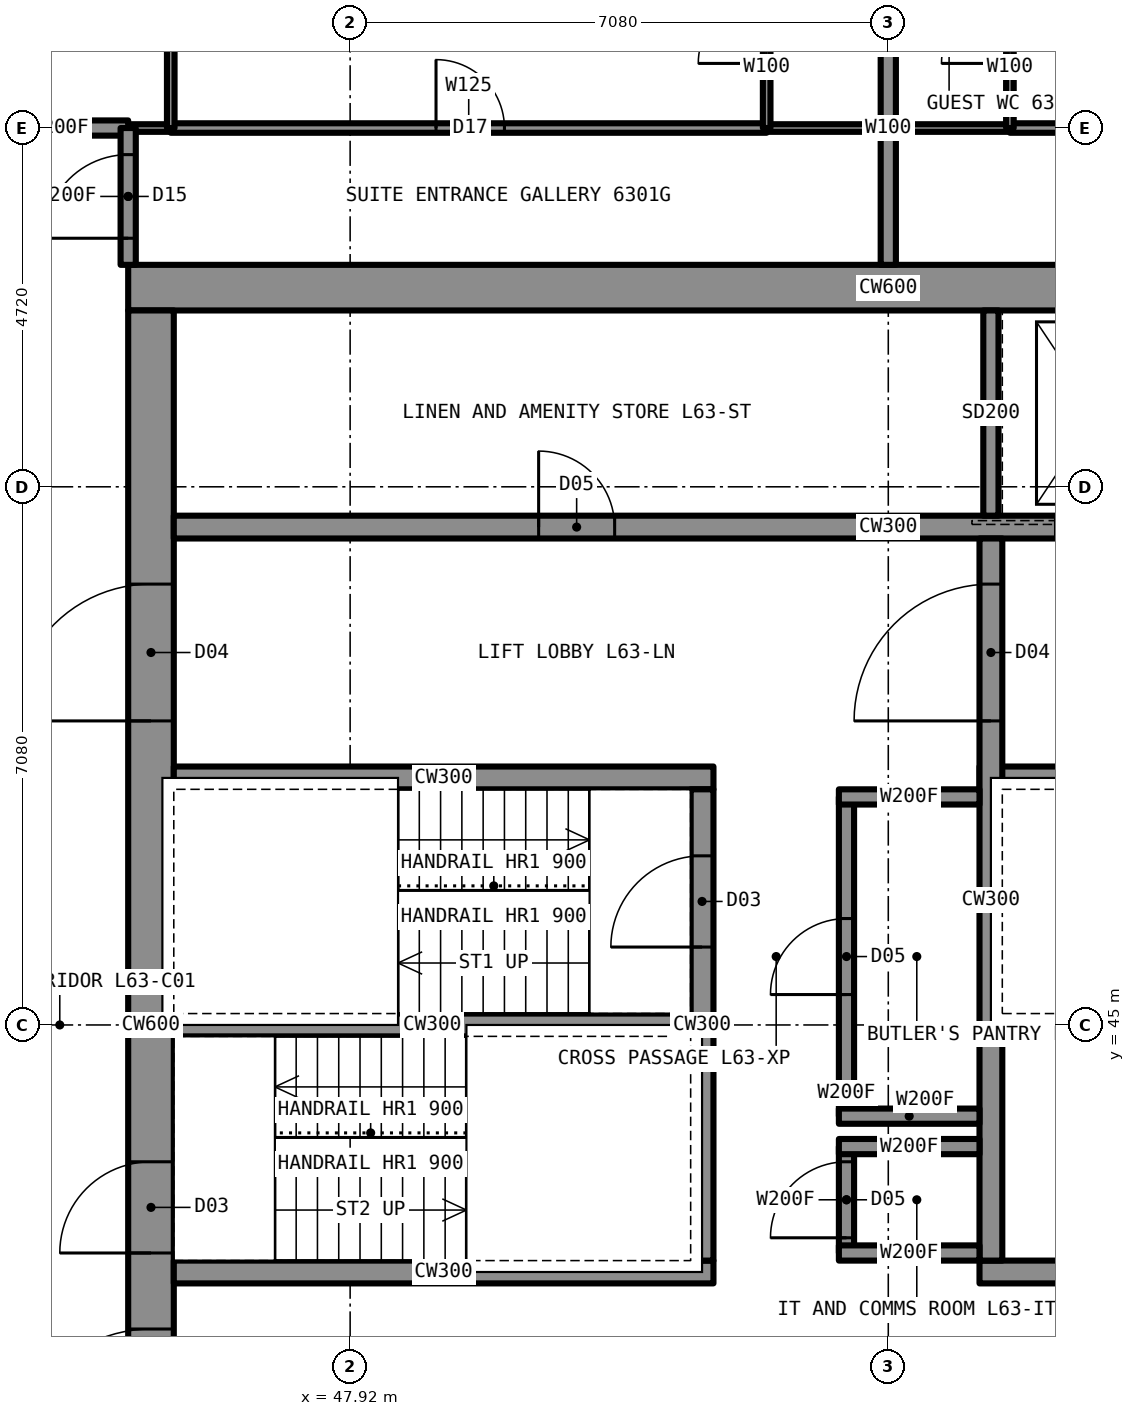
"""IFC4 building model, lengths in metres.
Left out: names, types, materials, properties, quantities, classifications, styles, units other than length and angle.
Written with IfcOpenShell. Run it as: python <this file> out.ifc"""

import sys

from ifc_helpers import new_model, si_unit, direction, frame, frame_2d, origin, place, context, subcontext, project, spatial, rectangle, extrude, element, fill, save


model = new_model("IFC4")
c1 = context("Model", 3, precision=1e-05, world=origin(), true_north=direction((0.0, 1.0)))
c2 = subcontext(c1, "Body", "Model", "MODEL_VIEW")
j1 = project(units=[si_unit("LENGTHUNIT", "METRE"), si_unit("PLANEANGLEUNIT", "RADIAN")], contexts=[c1])
p1 = place(None, origin())
s1 = spatial("IfcSite", under=j1, at=p1, CompositionType="ELEMENT")
p2 = place(p1, origin())
s2 = spatial("IfcBuilding", under=s1, at=p2, CompositionType="ELEMENT")
p3 = place(p2, frame((0.0, 0.0, 226.7)))
s3 = spatial("IfcBuildingStorey", under=s2, at=p3, CompositionType="ELEMENT", Elevation=226.7)
p4 = place(p3, frame((45.0, 54.7, 0.0), z_axis=(0.0, 0.0, 1.0), x_axis=(1.0, 0.0, 0.0)))
e1 = element("IfcWall", 1, at=p4, inside=s3, PredefinedType="SHEAR", context=c2, shape_type="SweptSolid", body=[
    extrude(rectangle(XDim=20.0, YDim=0.6, at=frame_2d((10.0, 0.0))), origin(), (0.0, 0.0, 1.0), 3.5),
])
p5 = place(p3, frame((45.3, 35.6, 0.0), z_axis=(0.0, 0.0, 1.0), x_axis=(0.0, 1.0, 0.0)))
e2 = element("IfcWall", 2, at=p5, inside=s3, PredefinedType="SHEAR", context=c2, shape_type="SweptSolid", body=[
    extrude(rectangle(XDim=18.8, YDim=0.6, at=frame_2d((9.4, 0.0))), origin(), (0.0, 0.0, 1.0), 3.5),
])
p6 = place(p5, frame((13.4, 0.0, 0.0)))
e3 = element("IfcOpeningElement", 3, at=p6, cuts=e2, PredefinedType="OPENING", context=c2, shape_type="SweptSolid", body=[
    extrude(rectangle(XDim=1.8, YDim=2.2, at=frame_2d((0.9, 1.1))), frame((0.0, 0.31, 0.0), z_axis=(0.0, -1.0, 0.0), x_axis=(1.0, 0.0, 0.0)), (0.0, 0.0, 1.0), 0.62),
])
p7 = place(p5, frame((3.6, 0.0, 0.0)))
e4 = element("IfcOpeningElement", 4, at=p7, cuts=e2, PredefinedType="OPENING", context=c2, shape_type="SweptSolid", body=[
    extrude(rectangle(XDim=1.8, YDim=2.2, at=frame_2d((0.9, 1.1))), frame((0.0, 0.31, 0.0), z_axis=(0.0, -1.0, 0.0), x_axis=(1.0, 0.0, 0.0)), (0.0, 0.0, 1.0), 0.62),
])
p8 = place(p5, frame((6.4, 0.0, 0.0)))
e5 = element("IfcOpeningElement", 5, at=p8, cuts=e2, PredefinedType="OPENING", context=c2, shape_type="SweptSolid", body=[
    extrude(rectangle(XDim=1.2, YDim=2.2, at=frame_2d((0.6, 1.1))), frame((0.0, 0.31, 0.0), z_axis=(0.0, -1.0, 0.0), x_axis=(1.0, 0.0, 0.0)), (0.0, 0.0, 1.0), 0.62),
])
p9 = place(p3, frame((45.6, 51.55, 0.0), z_axis=(0.0, 0.0, 1.0), x_axis=(1.0, 0.0, 0.0)))
e6 = element("IfcWall", 6, at=p9, inside=s3, PredefinedType="SHEAR", context=c2, shape_type="SweptSolid", body=[
    extrude(rectangle(XDim=18.8, YDim=0.3, at=frame_2d((9.4, 0.0))), origin(), (0.0, 0.0, 1.0), 3.5),
])
p10 = place(p9, frame((4.8, 0.0, 0.0)))
e7 = element("IfcOpeningElement", 7, at=p10, cuts=e6, PredefinedType="OPENING", context=c2, shape_type="SweptSolid", body=[
    extrude(rectangle(XDim=1.0, YDim=2.1, at=frame_2d((0.5, 1.05))), frame((0.0, 0.16, 0.0), z_axis=(0.0, -1.0, 0.0), x_axis=(1.0, 0.0, 0.0)), (0.0, 0.0, 1.0), 0.32),
])
p11 = place(p9, frame((11.6, 0.0, 0.0)))
e8 = element("IfcOpeningElement", 8, at=p11, cuts=e6, PredefinedType="OPENING", context=c2, shape_type="SweptSolid", body=[
    extrude(rectangle(XDim=1.1, YDim=2.2, at=frame_2d((0.55, 1.1))), frame((0.0, 0.16, 0.0), z_axis=(0.0, -1.0, 0.0), x_axis=(1.0, 0.0, 0.0)), (0.0, 0.0, 1.0), 0.32),
])
p12 = place(p9, frame((14.3, 0.0, 0.0)))
e9 = element("IfcOpeningElement", 9, at=p12, cuts=e6, PredefinedType="OPENING", context=c2, shape_type="SweptSolid", body=[
    extrude(rectangle(XDim=1.1, YDim=2.2, at=frame_2d((0.55, 1.1))), frame((0.0, 0.16, 0.0), z_axis=(0.0, -1.0, 0.0), x_axis=(1.0, 0.0, 0.0)), (0.0, 0.0, 1.0), 0.32),
])
p13 = place(p3, frame((45.6, 48.25, 0.0), z_axis=(0.0, 0.0, 1.0), x_axis=(1.0, 0.0, 0.0)))
e10 = element("IfcWall", 10, at=p13, inside=s3, PredefinedType="SHEAR", context=c2, shape_type="SweptSolid", body=[
    extrude(rectangle(XDim=7.1, YDim=0.3, at=frame_2d((3.55, 0.0))), origin(), (0.0, 0.0, 1.0), 3.5),
])
p14 = place(p3, frame((56.2, 48.25, 0.0), z_axis=(0.0, 0.0, 1.0), x_axis=(1.0, 0.0, 0.0)))
e11 = element("IfcWall", 11, at=p14, inside=s3, PredefinedType="SHEAR", context=c2, shape_type="SweptSolid", body=[
    extrude(rectangle(XDim=8.2, YDim=0.3, at=frame_2d((4.1, 0.0))), origin(), (0.0, 0.0, 1.0), 3.5),
])
p15 = place(p14, frame((6.95, 0.0, 0.0)))
e12 = element("IfcOpeningElement", 12, at=p15, cuts=e11, PredefinedType="OPENING", context=c2, shape_type="SweptSolid", body=[
    extrude(rectangle(XDim=1.2, YDim=2.2, at=frame_2d((0.6, 1.1))), frame((0.0, 0.16, 0.0), z_axis=(0.0, -1.0, 0.0), x_axis=(1.0, 0.0, 0.0)), (0.0, 0.0, 1.0), 0.32),
])
p16 = place(p3, frame((45.6, 41.75, 0.0), z_axis=(0.0, 0.0, 1.0), x_axis=(1.0, 0.0, 0.0)))
e13 = element("IfcWall", 13, at=p16, inside=s3, PredefinedType="SHEAR", context=c2, shape_type="SweptSolid", body=[
    extrude(rectangle(XDim=7.1, YDim=0.3, at=frame_2d((3.55, 0.0))), origin(), (0.0, 0.0, 1.0), 3.5),
])
p17 = place(p3, frame((56.2, 41.75, 0.0), z_axis=(0.0, 0.0, 1.0), x_axis=(1.0, 0.0, 0.0)))
e14 = element("IfcWall", 14, at=p17, inside=s3, PredefinedType="SHEAR", context=c2, shape_type="SweptSolid", body=[
    extrude(rectangle(XDim=8.2, YDim=0.3, at=frame_2d((4.1, 0.0))), origin(), (0.0, 0.0, 1.0), 3.5),
])
p18 = place(p17, frame((3.3, 0.0, 0.0)))
e15 = element("IfcOpeningElement", 15, at=p18, cuts=e14, PredefinedType="OPENING", context=c2, shape_type="SweptSolid", body=[
    extrude(rectangle(XDim=1.0, YDim=2.1, at=frame_2d((0.5, 1.05))), frame((0.0, 0.16, 0.0), z_axis=(0.0, -1.0, 0.0), x_axis=(1.0, 0.0, 0.0)), (0.0, 0.0, 1.0), 0.32),
])
p19 = place(p3, frame((52.55, 41.9, 0.0), z_axis=(0.0, 0.0, 1.0), x_axis=(0.0, 1.0, 0.0)))
e16 = element("IfcWall", 16, at=p19, inside=s3, PredefinedType="SHEAR", context=c2, shape_type="SweptSolid", body=[
    extrude(rectangle(XDim=6.2, YDim=0.3, at=frame_2d((3.1, 0.0))), origin(), (0.0, 0.0, 1.0), 3.5),
])
p20 = place(p19, frame((4.125, 0.0, 0.0)))
e17 = element("IfcOpeningElement", 17, at=p20, cuts=e16, PredefinedType="OPENING", context=c2, shape_type="SweptSolid", body=[
    extrude(rectangle(XDim=1.2, YDim=2.2, at=frame_2d((0.6, 1.1))), frame((0.0, 0.16, 0.0), z_axis=(0.0, -1.0, 0.0), x_axis=(1.0, 0.0, 0.0)), (0.0, 0.0, 1.0), 0.32),
])
p21 = place(p3, frame((56.35, 41.9, 0.0), z_axis=(0.0, 0.0, 1.0), x_axis=(0.0, 1.0, 0.0)))
e18 = element("IfcWall", 18, at=p21, inside=s3, PredefinedType="SHEAR", context=c2, shape_type="SweptSolid", body=[
    extrude(rectangle(XDim=9.5, YDim=0.3, at=frame_2d((4.75, 0.0))), origin(), (0.0, 0.0, 1.0), 3.5),
])
p22 = place(p21, frame((7.1, 0.0, 0.0)))
e19 = element("IfcOpeningElement", 19, at=p22, cuts=e18, PredefinedType="OPENING", context=c2, shape_type="SweptSolid", body=[
    extrude(rectangle(XDim=1.8, YDim=2.2, at=frame_2d((0.9, 1.1))), frame((0.0, 0.16, 0.0), z_axis=(0.0, -1.0, 0.0), x_axis=(1.0, 0.0, 0.0)), (0.0, 0.0, 1.0), 0.32),
])
p23 = place(p3, frame((45.6, 45.0, 0.0), z_axis=(0.0, 0.0, 1.0), x_axis=(1.0, 0.0, 0.0)))
e20 = element("IfcWall", 20, at=p23, inside=s3, PredefinedType="SHEAR", context=c2, shape_type="SweptSolid", body=[
    extrude(rectangle(XDim=6.8, YDim=0.3, at=frame_2d((3.4, 0.0))), origin(), (0.0, 0.0, 1.0), 3.5),
])
p24 = place(p3, frame((56.5, 45.0, 0.0), z_axis=(0.0, 0.0, 1.0), x_axis=(1.0, 0.0, 0.0)))
e21 = element("IfcWall", 21, at=p24, inside=s3, PredefinedType="SHEAR", context=c2, shape_type="SweptSolid", body=[
    extrude(rectangle(XDim=7.9, YDim=0.3, at=frame_2d((3.95, 0.0))), origin(), (0.0, 0.0, 1.0), 3.5),
])
p25 = place(p3, frame((45.0, 56.8, 0.0), z_axis=(0.0, 0.0, 1.0), x_axis=(1.0, 0.0, 0.0)))
e22 = element("IfcWall", 22, at=p25, inside=s3, PredefinedType="PARTITIONING", context=c2, shape_type="SweptSolid", body=[
    extrude(rectangle(XDim=0.56, YDim=0.1, at=frame_2d((0.28, 0.0))), origin(), (0.0, 0.0, 1.0), 3.33),
])
p26 = place(p3, frame((53.4, 56.8, 0.0), z_axis=(0.0, 0.0, 1.0), x_axis=(1.0, 0.0, 0.0)))
e23 = element("IfcWall", 23, at=p26, inside=s3, PredefinedType="PARTITIONING", context=c2, shape_type="SweptSolid", body=[
    extrude(rectangle(XDim=3.2, YDim=0.1, at=frame_2d((1.6, 0.0))), origin(), (0.0, 0.0, 1.0), 3.33),
])
p27 = place(p3, frame((43.2, 56.8, 0.0), z_axis=(0.0, 0.0, 1.0), x_axis=(1.0, 0.0, 0.0)))
e24 = element("IfcWall", 24, at=p27, inside=s3, PredefinedType="PARTITIONING", context=c2, shape_type="SweptSolid", body=[
    extrude(rectangle(XDim=1.8, YDim=0.2, at=frame_2d((0.9, 0.0))), origin(), (0.0, 0.0, 1.0), 3.33),
])
p28 = place(p3, frame((45.56, 56.8, 0.0), z_axis=(0.0, 0.0, 1.0), x_axis=(1.0, 0.0, 0.0)))
e25 = element("IfcWall", 25, at=p28, inside=s3, PredefinedType="PARTITIONING", context=c2, shape_type="SweptSolid", body=[
    extrude(rectangle(XDim=7.84, YDim=0.125, at=frame_2d((3.92, 0.0))), origin(), (0.0, 0.0, 1.0), 3.33),
])
p29 = place(p28, frame((3.49, 0.0, 0.0)))
e26 = element("IfcOpeningElement", 26, at=p29, cuts=e25, PredefinedType="OPENING", context=c2, shape_type="SweptSolid", body=[
    extrude(rectangle(XDim=0.9, YDim=2.2, at=frame_2d((0.45, 1.1))), frame((0.0, 0.073, 0.0), z_axis=(0.0, -1.0, 0.0), x_axis=(1.0, 0.0, 0.0)), (0.0, 0.0, 1.0), 0.145),
])
p30 = place(p3, frame((56.6, 56.8, 0.0), z_axis=(0.0, 0.0, 1.0), x_axis=(1.0, 0.0, 0.0)))
e27 = element("IfcWall", 27, at=p30, inside=s3, PredefinedType="PARTITIONING", context=c2, shape_type="SweptSolid", body=[
    extrude(rectangle(XDim=7.84, YDim=0.125, at=frame_2d((3.92, 0.0))), origin(), (0.0, 0.0, 1.0), 3.33),
])
p31 = place(p30, frame((3.45, 0.0, 0.0)))
e28 = element("IfcOpeningElement", 28, at=p31, cuts=e27, PredefinedType="OPENING", context=c2, shape_type="SweptSolid", body=[
    extrude(rectangle(XDim=0.9, YDim=2.2, at=frame_2d((0.45, 1.1))), frame((0.0, 0.073, 0.0), z_axis=(0.0, -1.0, 0.0), x_axis=(1.0, 0.0, 0.0)), (0.0, 0.0, 1.0), 0.145),
])
p32 = place(p3, frame((53.4, 56.8, 0.0), z_axis=(0.0, 0.0, 1.0), x_axis=(0.0, 1.0, 0.0)))
e29 = element("IfcWall", 29, at=p32, inside=s3, PredefinedType="PARTITIONING", context=c2, shape_type="SweptSolid", body=[
    extrude(rectangle(XDim=2.2, YDim=0.1, at=frame_2d((1.1, 0.0))), origin(), (0.0, 0.0, 1.0), 3.33),
])
p33 = place(p32, frame((0.85, 0.0, 0.0)))
e30 = element("IfcOpeningElement", 30, at=p33, cuts=e29, PredefinedType="OPENING", context=c2, shape_type="SweptSolid", body=[
    extrude(rectangle(XDim=0.9, YDim=2.1, at=frame_2d((0.45, 1.05))), frame((0.0, 0.06, 0.0), z_axis=(0.0, -1.0, 0.0), x_axis=(1.0, 0.0, 0.0)), (0.0, 0.0, 1.0), 0.12),
])
p34 = place(p3, frame((45.0, 55.0, 0.0), z_axis=(0.0, 0.0, 1.0), x_axis=(0.0, 1.0, 0.0)))
e31 = element("IfcWall", 31, at=p34, inside=s3, PredefinedType="PARTITIONING", context=c2, shape_type="SweptSolid", body=[
    extrude(rectangle(XDim=1.8, YDim=0.2, at=frame_2d((0.9, 0.0))), origin(), (0.0, 0.0, 1.0), 3.33),
])
p35 = place(p34, frame((0.35, 0.0, 0.0)))
e32 = element("IfcOpeningElement", 32, at=p35, cuts=e31, PredefinedType="OPENING", context=c2, shape_type="SweptSolid", body=[
    extrude(rectangle(XDim=1.1, YDim=2.2, at=frame_2d((0.55, 1.1))), frame((0.0, 0.11, 0.0), z_axis=(0.0, -1.0, 0.0), x_axis=(1.0, 0.0, 0.0)), (0.0, 0.0, 1.0), 0.22),
])
p36 = place(p3, frame((45.56, 56.8, 0.0), z_axis=(0.0, 0.0, 1.0), x_axis=(0.0, 1.0, 0.0)))
e33 = element("IfcWall", 33, at=p36, inside=s3, PredefinedType="PARTITIONING", context=c2, shape_type="SweptSolid", body=[
    extrude(rectangle(XDim=2.8, YDim=0.1, at=frame_2d((1.4, 0.0))), origin(), (0.0, 0.0, 1.0), 3.33),
])
p37 = place(p3, frame((55.0, 55.0, 0.0), z_axis=(0.0, 0.0, 1.0), x_axis=(0.0, 1.0, 0.0)))
e34 = element("IfcWall", 34, at=p37, inside=s3, PredefinedType="PARTITIONING", context=c2, shape_type="SweptSolid", body=[
    extrude(rectangle(XDim=7.7, YDim=0.2, at=frame_2d((3.85, 0.0))), origin(), (0.0, 0.0, 1.0), 2.573),
])
p38 = place(p3, frame((56.6, 56.8, 0.0), z_axis=(0.0, 0.0, 1.0), x_axis=(0.0, 1.0, 0.0)))
e35 = element("IfcWall", 35, at=p38, inside=s3, PredefinedType="PARTITIONING", context=c2, shape_type="SweptSolid", body=[
    extrude(rectangle(XDim=2.2, YDim=0.1, at=frame_2d((1.1, 0.0))), origin(), (0.0, 0.0, 1.0), 3.33),
])
p39 = place(p38, frame((0.85, 0.0, 0.0)))
e36 = element("IfcOpeningElement", 36, at=p39, cuts=e35, PredefinedType="OPENING", context=c2, shape_type="SweptSolid", body=[
    extrude(rectangle(XDim=0.9, YDim=2.1, at=frame_2d((0.45, 1.05))), frame((0.0, 0.06, 0.0), z_axis=(0.0, -1.0, 0.0), x_axis=(1.0, 0.0, 0.0)), (0.0, 0.0, 1.0), 0.12),
])
p40 = place(p3, frame((54.45, 42.0, 0.0), z_axis=(0.0, 0.0, 1.0), x_axis=(0.0, 1.0, 0.0)))
e37 = element("IfcWall", 37, at=p40, inside=s3, PredefinedType="PARTITIONING", context=c2, shape_type="SweptSolid", body=[
    extrude(rectangle(XDim=2.3, YDim=0.2, at=frame_2d((1.15, 0.0))), origin(), (0.0, 0.0, 1.0), 3.33),
])
p41 = place(p40, frame((0.65, 0.0, 0.0)))
e38 = element("IfcOpeningElement", 38, at=p41, cuts=e37, PredefinedType="OPENING", context=c2, shape_type="SweptSolid", body=[
    extrude(rectangle(XDim=1.0, YDim=2.1, at=frame_2d((0.5, 1.05))), frame((0.0, 0.11, 0.0), z_axis=(0.0, -1.0, 0.0), x_axis=(1.0, 0.0, 0.0)), (0.0, 0.0, 1.0), 0.22),
])
for number, where, z_axis, x_axis in (
    (39, (54.35, 42.0, 0.0), (0.0, 0.0, 1.0), (1.0, 0.0, 0.0)),
    (40, (54.35, 44.3, 0.0), (0.0, 0.0, 1.0), (1.0, 0.0, 0.0)),
):
    element("IfcWall", number, at=place(p3, frame(where, z_axis=z_axis, x_axis=x_axis)), inside=s3, PredefinedType="PARTITIONING", context=c2, shape_type="SweptSolid", body=[
        extrude(rectangle(XDim=1.85, YDim=0.2, at=frame_2d((0.925, 0.0))), origin(), (0.0, 0.0, 1.0), 3.33),
    ])
p42 = place(p3, frame((54.45, 44.7, 0.0), z_axis=(0.0, 0.0, 1.0), x_axis=(0.0, 1.0, 0.0)))
e41 = element("IfcWall", 41, at=p42, inside=s3, PredefinedType="PARTITIONING", context=c2, shape_type="SweptSolid", body=[
    extrude(rectangle(XDim=3.3, YDim=0.2, at=frame_2d((1.65, 0.0))), origin(), (0.0, 0.0, 1.0), 3.33),
])
p43 = place(p42, frame((1.15, 0.0, 0.0)))
e42 = element("IfcOpeningElement", 42, at=p43, cuts=e41, PredefinedType="OPENING", context=c2, shape_type="SweptSolid", body=[
    extrude(rectangle(XDim=1.0, YDim=2.1, at=frame_2d((0.5, 1.05))), frame((0.0, 0.11, 0.0), z_axis=(0.0, -1.0, 0.0), x_axis=(1.0, 0.0, 0.0)), (0.0, 0.0, 1.0), 0.22),
])
for number, where, z_axis, x_axis in (
    (43, (54.35, 44.7, 0.0), (0.0, 0.0, 1.0), (1.0, 0.0, 0.0)),
    (44, (54.35, 48.0, 0.0), (0.0, 0.0, 1.0), (1.0, 0.0, 0.0)),
):
    element("IfcWall", number, at=place(p3, frame(where, z_axis=z_axis, x_axis=x_axis)), inside=s3, PredefinedType="PARTITIONING", context=c2, shape_type="SweptSolid", body=[
        extrude(rectangle(XDim=1.85, YDim=0.2, at=frame_2d((0.925, 0.0))), origin(), (0.0, 0.0, 1.0), 3.33),
    ])
p44 = place(p3, frame((56.35, 51.7, 0.0), z_axis=(0.0, 0.0, 1.0), x_axis=(0.0, 1.0, 0.0)))
e45 = element("IfcWall", 45, at=p44, inside=s3, PredefinedType="PARTITIONING", context=c2, shape_type="SweptSolid", body=[
    extrude(rectangle(XDim=2.7, YDim=0.2, at=frame_2d((1.35, 0.0))), origin(), (0.0, 0.0, 1.0), 3.33),
])
p45 = place(p29, origin())
e46 = element("IfcDoor", 46, at=p45, inside=s3, OperationType="SINGLE_SWING_LEFT", PredefinedType="DOOR", context=c2, shape_type="SweptSolid", body=[
    extrude(rectangle(XDim=0.9, YDim=2.2, at=frame_2d((0.45, 1.1))), frame((0.0, 0.025, 0.0), z_axis=(0.0, -1.0, 0.0), x_axis=(1.0, 0.0, 0.0)), (0.0, 0.0, 1.0), 0.05),
])
fill(e26, e46)
p46 = place(p35, origin())
e47 = element("IfcDoor", 47, at=p46, inside=s3, OperationType="SINGLE_SWING_LEFT", PredefinedType="DOOR", context=c2, shape_type="SweptSolid", body=[
    extrude(rectangle(XDim=1.1, YDim=2.2, at=frame_2d((0.55, 1.1))), frame((0.0, 0.025, 0.0), z_axis=(0.0, -1.0, 0.0), x_axis=(1.0, 0.0, 0.0)), (0.0, 0.0, 1.0), 0.05),
])
fill(e32, e47)
p47 = place(p33, origin())
e48 = element("IfcDoor", 48, at=p47, inside=s3, OperationType="SINGLE_SWING_LEFT", PredefinedType="DOOR", context=c2, shape_type="SweptSolid", body=[
    extrude(rectangle(XDim=0.9, YDim=2.1, at=frame_2d((0.45, 1.05))), frame((0.0, 0.025, 0.0), z_axis=(0.0, -1.0, 0.0), x_axis=(1.0, 0.0, 0.0)), (0.0, 0.0, 1.0), 0.05),
])
fill(e30, e48)
p48 = place(p39, origin())
e49 = element("IfcDoor", 49, at=p48, inside=s3, OperationType="SINGLE_SWING_LEFT", PredefinedType="DOOR", context=c2, shape_type="SweptSolid", body=[
    extrude(rectangle(XDim=0.9, YDim=2.1, at=frame_2d((0.45, 1.05))), frame((0.0, 0.025, 0.0), z_axis=(0.0, -1.0, 0.0), x_axis=(1.0, 0.0, 0.0)), (0.0, 0.0, 1.0), 0.05),
])
fill(e36, e49)
p49 = place(p41, origin())
e50 = element("IfcDoor", 50, at=p49, inside=s3, OperationType="SINGLE_SWING_LEFT", PredefinedType="DOOR", context=c2, shape_type="SweptSolid", body=[
    extrude(rectangle(XDim=1.0, YDim=2.1, at=frame_2d((0.5, 1.05))), frame((0.0, 0.025, 0.0), z_axis=(0.0, -1.0, 0.0), x_axis=(1.0, 0.0, 0.0)), (0.0, 0.0, 1.0), 0.05),
])
fill(e38, e50)
p50 = place(p43, origin())
e51 = element("IfcDoor", 51, at=p50, inside=s3, OperationType="SINGLE_SWING_LEFT", PredefinedType="DOOR", context=c2, shape_type="SweptSolid", body=[
    extrude(rectangle(XDim=1.0, YDim=2.1, at=frame_2d((0.5, 1.05))), frame((0.0, 0.025, 0.0), z_axis=(0.0, -1.0, 0.0), x_axis=(1.0, 0.0, 0.0)), (0.0, 0.0, 1.0), 0.05),
])
fill(e42, e51)
p51 = place(p6, origin())
e52 = element("IfcDoor", 52, at=p51, inside=s3, OperationType="DOUBLE_DOOR_SINGLE_SWING", PredefinedType="DOOR", context=c2, shape_type="SweptSolid", body=[
    extrude(rectangle(XDim=1.8, YDim=2.2, at=frame_2d((0.9, 1.1))), frame((0.0, 0.025, 0.0), z_axis=(0.0, -1.0, 0.0), x_axis=(1.0, 0.0, 0.0)), (0.0, 0.0, 1.0), 0.05),
])
fill(e3, e52)
p52 = place(p7, origin())
e53 = element("IfcDoor", 53, at=p52, inside=s3, OperationType="DOUBLE_DOOR_SINGLE_SWING", PredefinedType="DOOR", context=c2, shape_type="SweptSolid", body=[
    extrude(rectangle(XDim=1.8, YDim=2.2, at=frame_2d((0.9, 1.1))), frame((0.0, 0.025, 0.0), z_axis=(0.0, -1.0, 0.0), x_axis=(1.0, 0.0, 0.0)), (0.0, 0.0, 1.0), 0.05),
])
fill(e4, e53)
p53 = place(p22, origin())
e54 = element("IfcDoor", 54, at=p53, inside=s3, OperationType="DOUBLE_DOOR_SINGLE_SWING", PredefinedType="DOOR", context=c2, shape_type="SweptSolid", body=[
    extrude(rectangle(XDim=1.8, YDim=2.2, at=frame_2d((0.9, 1.1))), frame((0.0, 0.025, 0.0), z_axis=(0.0, -1.0, 0.0), x_axis=(1.0, 0.0, 0.0)), (0.0, 0.0, 1.0), 0.05),
])
fill(e19, e54)
p54 = place(p20, origin())
e55 = element("IfcDoor", 55, at=p54, inside=s3, OperationType="SINGLE_SWING_LEFT", PredefinedType="DOOR", context=c2, shape_type="SweptSolid", body=[
    extrude(rectangle(XDim=1.2, YDim=2.2, at=frame_2d((0.6, 1.1))), frame((0.0, 0.025, 0.0), z_axis=(0.0, -1.0, 0.0), x_axis=(1.0, 0.0, 0.0)), (0.0, 0.0, 1.0), 0.05),
])
fill(e17, e55)
p55 = place(p8, origin())
e56 = element("IfcDoor", 56, at=p55, inside=s3, OperationType="SINGLE_SWING_LEFT", PredefinedType="DOOR", context=c2, shape_type="SweptSolid", body=[
    extrude(rectangle(XDim=1.2, YDim=2.2, at=frame_2d((0.6, 1.1))), frame((0.0, 0.025, 0.0), z_axis=(0.0, -1.0, 0.0), x_axis=(1.0, 0.0, 0.0)), (0.0, 0.0, 1.0), 0.05),
])
fill(e5, e56)
p56 = place(p10, origin())
e57 = element("IfcDoor", 57, at=p56, inside=s3, OperationType="SINGLE_SWING_LEFT", PredefinedType="DOOR", context=c2, shape_type="SweptSolid", body=[
    extrude(rectangle(XDim=1.0, YDim=2.1, at=frame_2d((0.5, 1.05))), frame((0.0, 0.025, 0.0), z_axis=(0.0, -1.0, 0.0), x_axis=(1.0, 0.0, 0.0)), (0.0, 0.0, 1.0), 0.05),
])
fill(e7, e57)
save(model, sys.argv[1])
